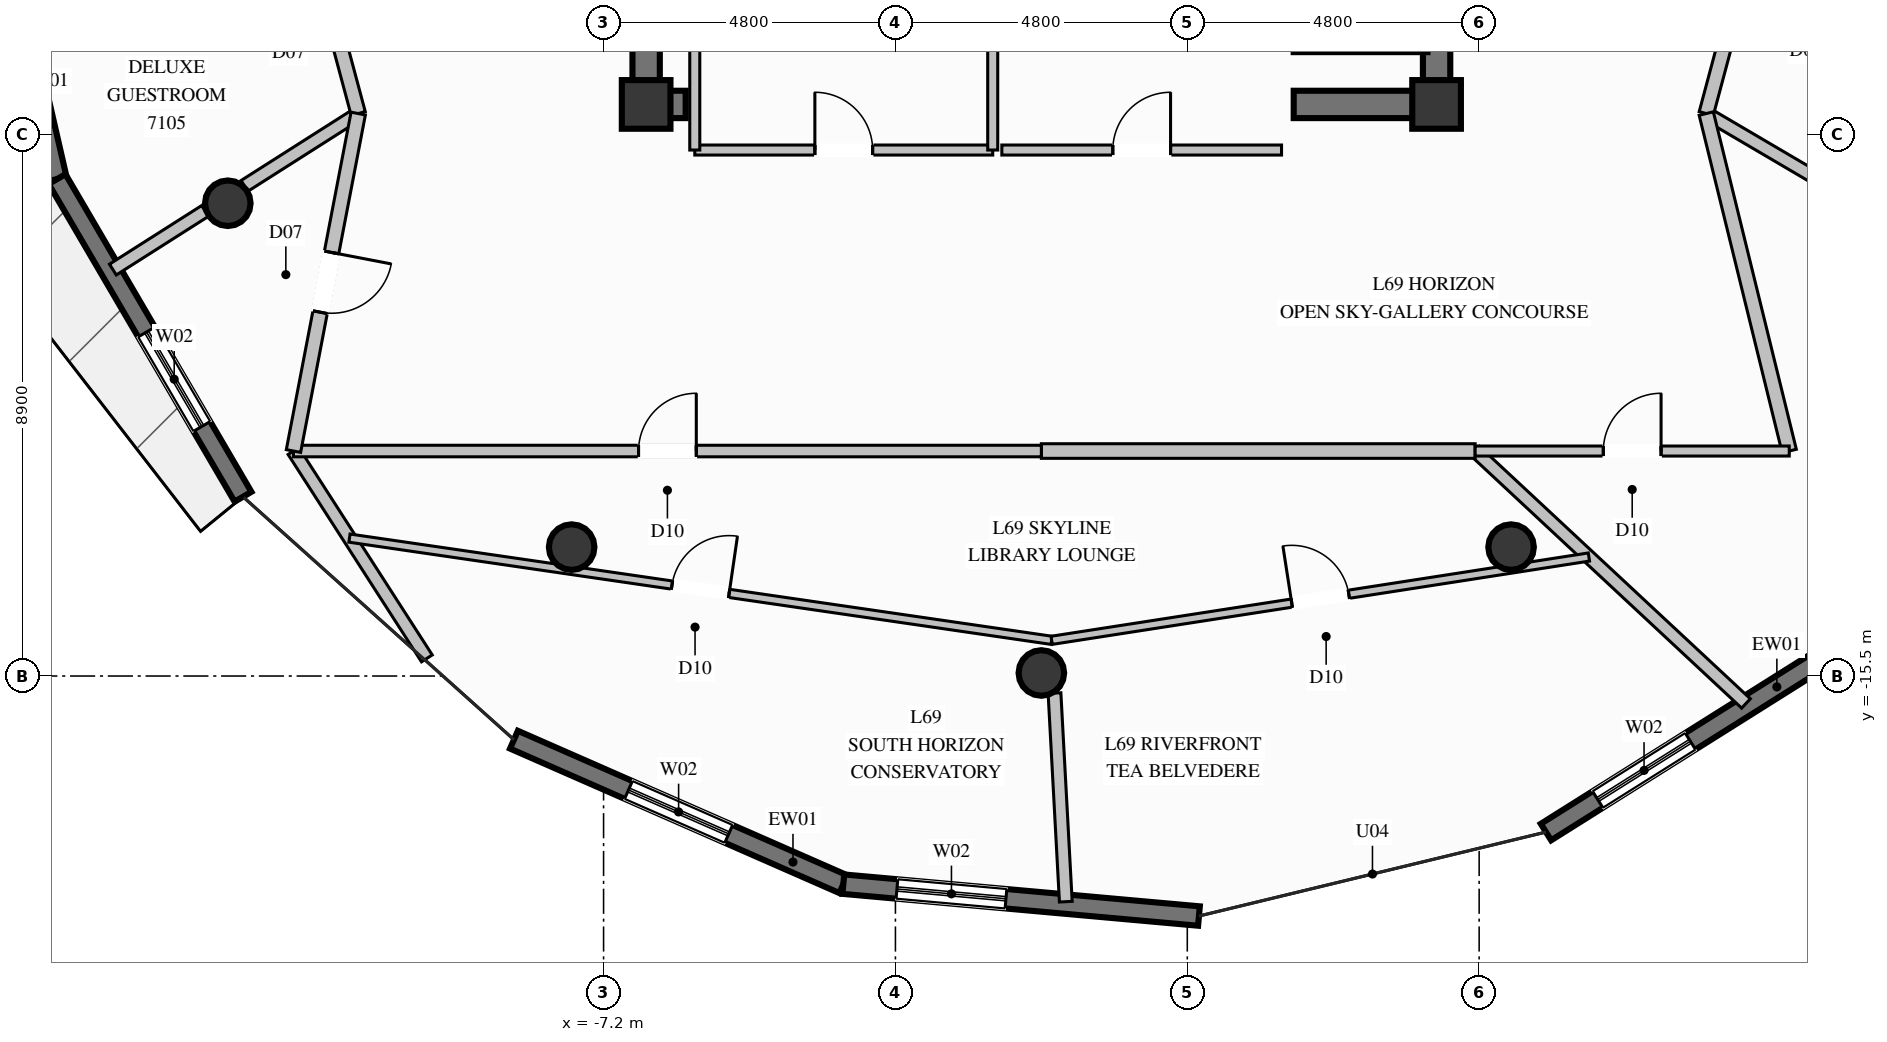
"""IFC4 building model, lengths in metres.
Left out: names, types, materials, properties, quantities, classifications, styles, units other than length and angle.
Written with IfcOpenShell. Run it as: python <this file> out.ifc"""

import sys

from ifc_helpers import new_model, si_unit, direction, frame, frame_2d, origin, origin_2d, place, context, subcontext, project, spatial, rectangle, circle, extrude, element, fill, save


model = new_model("IFC4")
c1 = context("Model", 3, precision=1e-05, world=origin(), true_north=direction((0.0, 1.0)))
c2 = subcontext(c1, "Body", "Model", "MODEL_VIEW")
j1 = project(units=[si_unit("LENGTHUNIT", "METRE"), si_unit("PLANEANGLEUNIT", "RADIAN")], contexts=[c1])
p1 = place(None, origin())
s1 = spatial("IfcSite", under=j1, at=p1, CompositionType="ELEMENT")
p2 = place(p1, origin())
s2 = spatial("IfcBuilding", under=s1, at=p2, CompositionType="ELEMENT")
p3 = place(p2, frame((0.0, 0.0, 266.8)))
s3 = spatial("IfcBuildingStorey", under=s2, at=p3, CompositionType="ELEMENT", Elevation=266.8)
for number, where, z_axis, x_axis in (
    (1, (-6.5, -6.1, 0.0), (0.0, 0.0, 1.0), (1.0, 0.0, 0.0)),
    (2, (6.5, -6.1, 0.0), (0.0, 0.0, 1.0), (1.0, 0.0, 0.0)),
):
    element("IfcColumn", number, at=place(p3, frame(where, z_axis=z_axis, x_axis=x_axis)), inside=s3, PredefinedType="COLUMN", context=c2, shape_type="SweptSolid", body=[
        extrude(rectangle(XDim=0.8, YDim=0.8, at=origin_2d()), origin(), (0.0, 0.0, 1.0), 3.8),
    ])
p4 = place(p3, frame((-6.275, -6.1, 0.0), z_axis=(0.0, 0.0, 1.0), x_axis=(1.0, 0.0, 0.0)))
e3 = element("IfcWall", 3, at=p4, inside=s3, PredefinedType="SHEAR", context=c2, shape_type="SweptSolid", body=[
    extrude(rectangle(XDim=0.425, YDim=0.45, at=frame_2d((0.212, 0.0))), origin(), (0.0, 0.0, 1.0), 3.8),
])
p5 = place(p3, frame((4.15, -6.1, 0.0), z_axis=(0.0, 0.0, 1.0), x_axis=(1.0, 0.0, 0.0)))
e4 = element("IfcWall", 4, at=p5, inside=s3, PredefinedType="SHEAR", context=c2, shape_type="SweptSolid", body=[
    extrude(rectangle(XDim=2.125, YDim=0.45, at=frame_2d((1.062, 0.0))), origin(), (0.0, 0.0, 1.0), 3.8),
])
p6 = place(p3, frame((-6.5, -6.325, 0.0), z_axis=(0.0, 0.0, 1.0), x_axis=(0.0, 1.0, 0.0)))
e5 = element("IfcWall", 5, at=p6, inside=s3, PredefinedType="SHEAR", context=c2, shape_type="SweptSolid", body=[
    extrude(rectangle(XDim=2.975, YDim=0.45, at=frame_2d((1.487, 0.0))), origin(), (0.0, 0.0, 1.0), 3.8),
])
p7 = place(p3, frame((6.5, -6.325, 0.0), z_axis=(0.0, 0.0, 1.0), x_axis=(0.0, 1.0, 0.0)))
e6 = element("IfcWall", 6, at=p7, inside=s3, PredefinedType="SHEAR", context=c2, shape_type="SweptSolid", body=[
    extrude(rectangle(XDim=3.975, YDim=0.45, at=frame_2d((1.987, 0.0))), origin(), (0.0, 0.0, 1.0), 3.8),
])
for number, where, z_axis, x_axis in (
    (7, (-13.38, -7.725, 0.0), (0.0, 0.0, 1.0), (1.0, 0.0, 0.0)),
    (8, (-7.725, -13.38, 0.0), (0.0, 0.0, 1.0), (1.0, 0.0, 0.0)),
    (9, (0.0, -15.45, 0.0), (0.0, 0.0, 1.0), (1.0, 0.0, 0.0)),
    (10, (7.725, -13.38, 0.0), (0.0, 0.0, 1.0), (1.0, 0.0, 0.0)),
):
    element("IfcColumn", number, at=place(p3, frame(where, z_axis=z_axis, x_axis=x_axis)), inside=s3, PredefinedType="COLUMN", context=c2, shape_type="SweptSolid", body=[
        extrude(circle(Radius=0.375, at=origin_2d()), origin(), (0.0, 0.0, 1.0), 3.8),
    ])
p8 = place(p3, frame((13.307, -14.918, 0.0), z_axis=(0.0, 0.0, 1.0), x_axis=(-0.846622734403, -0.532193522689, 0.0)))
e11 = element("IfcWall", 11, at=p8, inside=s3, PredefinedType="SOLIDWALL", context=c2, shape_type="SweptSolid", body=[
    extrude(rectangle(XDim=5.915, YDim=0.32, at=frame_2d((2.958, 0.0))), origin(), (0.0, 0.0, 1.0), 3.57),
])
p9 = place(p8, frame((3.11, 0.0, 0.35)))
e12 = element("IfcOpeningElement", 12, at=p9, cuts=e11, PredefinedType="OPENING", context=c2, shape_type="SweptSolid", body=[
    extrude(rectangle(XDim=1.8, YDim=2.6, at=frame_2d((0.9, 1.3))), frame((0.0, 0.17, 0.0), z_axis=(0.0, -1.0, 0.0), x_axis=(1.0, 0.0, 0.0)), (0.0, 0.0, 1.0), 0.34),
])
p10 = place(p3, frame((-16.188, -7.328, 0.0), z_axis=(0.0, 0.0, 1.0), x_axis=(-0.223282610096, 0.974753751482, 0.0)))
e13 = element("IfcWall", 13, at=p10, inside=s3, PredefinedType="SOLIDWALL", context=c2, shape_type="SweptSolid", body=[
    extrude(rectangle(XDim=6.096, YDim=0.32, at=frame_2d((3.048, 0.0))), origin(), (0.0, 0.0, 1.0), 3.57),
])
p11 = place(p10, frame((2.148, 0.0, 0.35)))
e14 = element("IfcOpeningElement", 14, at=p11, cuts=e13, PredefinedType="OPENING", context=c2, shape_type="SweptSolid", body=[
    extrude(rectangle(XDim=1.8, YDim=2.6, at=frame_2d((0.9, 1.3))), frame((0.0, 0.17, 0.0), z_axis=(0.0, -1.0, 0.0), x_axis=(1.0, 0.0, 0.0)), (0.0, 0.0, 1.0), 0.34),
])
p12 = place(p3, frame((-13.13, -12.552, 0.0), z_axis=(0.0, 0.0, 1.0), x_axis=(-0.505189458577, 0.863008465163, 0.0)))
e15 = element("IfcWall", 15, at=p12, inside=s3, PredefinedType="SOLIDWALL", context=c2, shape_type="SweptSolid", body=[
    extrude(rectangle(XDim=6.053, YDim=0.32, at=frame_2d((3.027, 0.0))), origin(), (0.0, 0.0, 1.0), 3.57),
])
p13 = place(p12, frame((1.34, 0.0, 0.35)))
e16 = element("IfcOpeningElement", 16, at=p13, cuts=e15, PredefinedType="OPENING", context=c2, shape_type="SweptSolid", body=[
    extrude(rectangle(XDim=1.8, YDim=2.6, at=frame_2d((0.9, 1.3))), frame((0.0, 0.17, 0.0), z_axis=(0.0, -1.0, 0.0), x_axis=(1.0, 0.0, 0.0)), (0.0, 0.0, 1.0), 0.34),
])
p14 = place(p3, frame((-3.257, -18.923, 0.0), z_axis=(0.0, 0.0, 1.0), x_axis=(-0.915781816255, 0.401676069758, 0.0)))
e17 = element("IfcWall", 17, at=p14, inside=s3, PredefinedType="SOLIDWALL", context=c2, shape_type="SweptSolid", body=[
    extrude(rectangle(XDim=5.915, YDim=0.32, at=frame_2d((2.958, 0.0))), origin(), (0.0, 0.0, 1.0), 3.57),
])
p15 = place(p14, frame((2.058, 0.0, 0.35)))
e18 = element("IfcOpeningElement", 18, at=p15, cuts=e17, PredefinedType="OPENING", context=c2, shape_type="SweptSolid", body=[
    extrude(rectangle(XDim=1.8, YDim=2.6, at=frame_2d((0.9, 1.3))), frame((0.0, 0.17, 0.0), z_axis=(0.0, -1.0, 0.0), x_axis=(1.0, 0.0, 0.0)), (0.0, 0.0, 1.0), 0.34),
])
p16 = place(p3, frame((2.592, -19.447, 0.0), z_axis=(0.0, 0.0, 1.0), x_axis=(-0.996012281509, 0.089216226568, 0.0)))
e19 = element("IfcWall", 19, at=p16, inside=s3, PredefinedType="SOLIDWALL", context=c2, shape_type="SweptSolid", body=[
    extrude(rectangle(XDim=5.873, YDim=0.32, at=frame_2d((2.936, 0.0))), origin(), (0.0, 0.0, 1.0), 3.57),
])
p17 = place(p16, frame((3.187, 0.0, 0.35)))
e20 = element("IfcOpeningElement", 20, at=p17, cuts=e19, PredefinedType="OPENING", context=c2, shape_type="SweptSolid", body=[
    extrude(rectangle(XDim=1.8, YDim=2.6, at=frame_2d((0.9, 1.3))), frame((0.0, 0.17, 0.0), z_axis=(0.0, -1.0, 0.0), x_axis=(1.0, 0.0, 0.0)), (0.0, 0.0, 1.0), 0.34),
])
p18 = place(p3, frame((-5.7, -6.85, 0.0), z_axis=(0.0, 0.0, 1.0), x_axis=(1.0, 0.0, 0.0)))
e21 = element("IfcWall", 21, at=p18, inside=s3, PredefinedType="PARTITIONING", context=c2, shape_type="SweptSolid", body=[
    extrude(rectangle(XDim=4.9, YDim=0.165, at=frame_2d((2.45, 0.0))), origin(), (0.0, 0.0, 1.0), 2.655),
])
p19 = place(p18, frame((1.975, 0.0, 0.0)))
e22 = element("IfcOpeningElement", 22, at=p19, cuts=e21, PredefinedType="OPENING", context=c2, shape_type="SweptSolid", body=[
    extrude(rectangle(XDim=0.95, YDim=2.1, at=frame_2d((0.475, 1.05))), frame((0.0, 0.093, 0.0), z_axis=(0.0, -1.0, 0.0), x_axis=(1.0, 0.0, 0.0)), (0.0, 0.0, 1.0), 0.185),
])
p20 = place(p3, frame((-0.8, -6.85, 0.0), z_axis=(0.0, 0.0, 1.0), x_axis=(0.0, 1.0, 0.0)))
e23 = element("IfcWall", 23, at=p20, inside=s3, PredefinedType="PARTITIONING", context=c2, shape_type="SweptSolid", body=[
    extrude(rectangle(XDim=3.35, YDim=0.165, at=frame_2d((1.675, 0.0))), origin(), (0.0, 0.0, 1.0), 3.57),
])
p21 = place(p3, frame((-5.7, -3.5, 0.0), z_axis=(0.0, 0.0, 1.0), x_axis=(0.0, -1.0, 0.0)))
e24 = element("IfcWall", 24, at=p21, inside=s3, PredefinedType="PARTITIONING", context=c2, shape_type="SweptSolid", body=[
    extrude(rectangle(XDim=3.35, YDim=0.165, at=frame_2d((1.675, 0.0))), origin(), (0.0, 0.0, 1.0), 2.655),
])
p22 = place(p3, frame((-0.65, -6.85, 0.0), z_axis=(0.0, 0.0, 1.0), x_axis=(1.0, 0.0, 0.0)))
e25 = element("IfcWall", 25, at=p22, inside=s3, PredefinedType="PARTITIONING", context=c2, shape_type="SweptSolid", body=[
    extrude(rectangle(XDim=4.6, YDim=0.165, at=frame_2d((2.3, 0.0))), origin(), (0.0, 0.0, 1.0), 2.655),
])
p23 = place(p22, frame((1.825, 0.0, 0.0)))
e26 = element("IfcOpeningElement", 26, at=p23, cuts=e25, PredefinedType="OPENING", context=c2, shape_type="SweptSolid", body=[
    extrude(rectangle(XDim=0.95, YDim=2.1, at=frame_2d((0.475, 1.05))), frame((0.0, 0.093, 0.0), z_axis=(0.0, -1.0, 0.0), x_axis=(1.0, 0.0, 0.0)), (0.0, 0.0, 1.0), 0.185),
])
p24 = place(p3, frame((-11.235, -6.25, 0.0), z_axis=(0.0, 0.0, 1.0), x_axis=(-0.843783883801, -0.536683107092, 0.0)))
e27 = element("IfcWall", 27, at=p24, inside=s3, PredefinedType="PARTITIONING", context=c2, shape_type="SweptSolid", body=[
    extrude(rectangle(XDim=2.217, YDim=0.21, at=frame_2d((1.109, 0.0))), origin(), (0.0, 0.0, 1.0), 3.085),
])
p25 = place(p3, frame((-13.754, -7.852, 0.0), z_axis=(0.0, 0.0, 1.0), x_axis=(-0.843896422102, -0.536506131152, 0.0)))
e28 = element("IfcWall", 28, at=p25, inside=s3, PredefinedType="PARTITIONING", context=c2, shape_type="SweptSolid", body=[
    extrude(rectangle(XDim=1.797, YDim=0.21, at=frame_2d((0.898, 0.0))), origin(), (0.0, 0.0, 1.0), 3.57),
])
p26 = place(p3, frame((10.935, -6.25, 0.0), z_axis=(0.0, 0.0, 1.0), x_axis=(0.862250119525, -0.506482705903, 0.0)))
e29 = element("IfcWall", 29, at=p26, inside=s3, PredefinedType="PARTITIONING", context=c2, shape_type="SweptSolid", body=[
    extrude(rectangle(XDim=2.462, YDim=0.21, at=frame_2d((1.231, 0.0))), origin(), (0.0, 0.0, 1.0), 3.085),
])
p27 = place(p3, frame((-12.23, -2.538, 0.0), z_axis=(0.0, 0.0, 1.0), x_axis=(0.258884274469, -0.965908345772, 0.0)))
e30 = element("IfcWall", 30, at=p27, inside=s3, PredefinedType="PARTITIONING", context=c2, shape_type="SweptSolid", body=[
    extrude(rectangle(XDim=3.843, YDim=0.24, at=frame_2d((1.921, 0.0))), origin(), (0.0, 0.0, 1.0), 3.57),
])
p28 = place(p27, frame((1.422, 0.0, 0.0)))
e31 = element("IfcOpeningElement", 31, at=p28, cuts=e30, PredefinedType="OPENING", context=c2, shape_type="SweptSolid", body=[
    extrude(rectangle(XDim=1.0, YDim=2.2, at=frame_2d((0.5, 1.1))), frame((0.0, 0.13, 0.0), z_axis=(0.0, -1.0, 0.0), x_axis=(1.0, 0.0, 0.0)), (0.0, 0.0, 1.0), 0.26),
])
p29 = place(p3, frame((10.935, -6.25, 0.0), z_axis=(0.0, 0.0, 1.0), x_axis=(0.258727314432, 0.96595040078, 0.0)))
e32 = element("IfcWall", 32, at=p29, inside=s3, PredefinedType="PARTITIONING", context=c2, shape_type="SweptSolid", body=[
    extrude(rectangle(XDim=2.783, YDim=0.24, at=frame_2d((1.391, 0.0))), origin(), (0.0, 0.0, 1.0), 3.57),
])
p30 = place(p3, frame((7.134, -11.8, 0.0), z_axis=(0.0, 0.0, 1.0), x_axis=(0.731644317953, -0.681686579013, 0.0)))
e33 = element("IfcWall", 33, at=p30, inside=s3, PredefinedType="PARTITIONING", context=c2, shape_type="SweptSolid", body=[
    extrude(rectangle(XDim=6.089, YDim=0.21, at=frame_2d((3.044, 0.0))), origin(), (0.0, 0.0, 1.0), 3.57),
])
p31 = place(p3, frame((-12.3, -11.8, 0.0), z_axis=(0.0, 0.0, 1.0), x_axis=(0.541107501705, -0.840953430101, 0.0)))
e34 = element("IfcWall", 34, at=p31, inside=s3, PredefinedType="PARTITIONING", context=c2, shape_type="SweptSolid", body=[
    extrude(rectangle(XDim=4.055, YDim=0.21, at=frame_2d((2.027, 0.0))), origin(), (0.0, 0.0, 1.0), 3.57),
])
p32 = place(p3, frame((0.0, -11.8, 0.0), z_axis=(0.0, 0.0, 1.0), x_axis=(1.0, 0.0, 0.0)))
e35 = element("IfcWall", 35, at=p32, inside=s3, PredefinedType="PARTITIONING", context=c2, shape_type="SweptSolid", body=[
    extrude(rectangle(XDim=7.134, YDim=0.24, at=frame_2d((3.567, 0.0))), origin(), (0.0, 0.0, 1.0), 3.57),
])
p33 = place(p3, frame((-12.3, -11.8, 0.0), z_axis=(0.0, 0.0, 1.0), x_axis=(1.0, 0.0, 0.0)))
e36 = element("IfcWall", 36, at=p33, inside=s3, PredefinedType="PARTITIONING", context=c2, shape_type="SweptSolid", body=[
    extrude(rectangle(XDim=12.3, YDim=0.19, at=frame_2d((6.15, 0.0))), origin(), (0.0, 0.0, 1.0), 3.57),
])
p34 = place(p33, frame((5.675, 0.0, 0.0)))
e37 = element("IfcOpeningElement", 37, at=p34, cuts=e36, PredefinedType="OPENING", context=c2, shape_type="SweptSolid", body=[
    extrude(rectangle(XDim=0.95, YDim=2.1, at=frame_2d((0.475, 1.05))), frame((0.0, 0.105, 0.0), z_axis=(0.0, -1.0, 0.0), x_axis=(1.0, 0.0, 0.0)), (0.0, 0.0, 1.0), 0.21),
])
p35 = place(p3, frame((-11.235, -6.25, 0.0), z_axis=(0.0, 0.0, 1.0), x_axis=(-0.18844199237, -0.982084321997, 0.0)))
e38 = element("IfcWall", 38, at=p35, inside=s3, PredefinedType="PARTITIONING", context=c2, shape_type="SweptSolid", body=[
    extrude(rectangle(XDim=5.651, YDim=0.24, at=frame_2d((2.826, 0.0))), origin(), (0.0, 0.0, 1.0), 3.57),
])
p36 = place(p35, frame((2.326, 0.0, 0.0)))
e39 = element("IfcOpeningElement", 39, at=p36, cuts=e38, PredefinedType="OPENING", context=c2, shape_type="SweptSolid", body=[
    extrude(rectangle(XDim=1.0, YDim=2.2, at=frame_2d((0.5, 1.1))), frame((0.0, 0.13, 0.0), z_axis=(0.0, -1.0, 0.0), x_axis=(1.0, 0.0, 0.0)), (0.0, 0.0, 1.0), 0.26),
])
p37 = place(p3, frame((0.216, -15.781, 0.0), z_axis=(0.0, 0.0, 1.0), x_axis=(0.054159130596, -0.99853231724, 0.0)))
e40 = element("IfcWall", 40, at=p37, inside=s3, PredefinedType="PARTITIONING", context=c2, shape_type="SweptSolid", body=[
    extrude(rectangle(XDim=3.435, YDim=0.21, at=frame_2d((1.718, 0.0))), origin(), (0.0, 0.0, 1.0), 3.57),
])
p38 = place(p3, frame((-11.379, -13.232, 0.0), z_axis=(0.0, 0.0, 1.0), x_axis=(0.989568551516, -0.144062770523, 0.0)))
e41 = element("IfcWall", 41, at=p38, inside=s3, PredefinedType="PARTITIONING", context=c2, shape_type="SweptSolid", body=[
    extrude(rectangle(XDim=11.67, YDim=0.135, at=frame_2d((5.835, 0.0))), origin(), (0.0, 0.0, 1.0), 3.137),
])
p39 = place(p38, frame((5.36, 0.0, 0.0)))
e42 = element("IfcOpeningElement", 42, at=p39, cuts=e41, PredefinedType="OPENING", context=c2, shape_type="SweptSolid", body=[
    extrude(rectangle(XDim=0.95, YDim=2.1, at=frame_2d((0.475, 1.05))), frame((0.0, 0.078, 0.0), z_axis=(0.0, -1.0, 0.0), x_axis=(1.0, 0.0, 0.0)), (0.0, 0.0, 1.0), 0.155),
])
p40 = place(p3, frame((0.169, -14.913, 0.0), z_axis=(0.0, 0.0, 1.0), x_axis=(0.988190446512, 0.153230680422, 0.0)))
e43 = element("IfcWall", 43, at=p40, inside=s3, PredefinedType="PARTITIONING", context=c2, shape_type="SweptSolid", body=[
    extrude(rectangle(XDim=8.942, YDim=0.135, at=frame_2d((4.471, 0.0))), origin(), (0.0, 0.0, 1.0), 3.137),
])
p41 = place(p40, frame((3.996, 0.0, 0.0)))
e44 = element("IfcOpeningElement", 44, at=p41, cuts=e43, PredefinedType="OPENING", context=c2, shape_type="SweptSolid", body=[
    extrude(rectangle(XDim=0.95, YDim=2.1, at=frame_2d((0.475, 1.05))), frame((0.0, 0.078, 0.0), z_axis=(0.0, -1.0, 0.0), x_axis=(1.0, 0.0, 0.0)), (0.0, 0.0, 1.0), 0.155),
])
p42 = place(p3, frame((12.3, -11.8, 0.0), z_axis=(0.0, 0.0, 1.0), x_axis=(-0.238825099749, 0.971062599285, 0.0)))
e45 = element("IfcWall", 45, at=p42, inside=s3, PredefinedType="PARTITIONING", context=c2, shape_type="SweptSolid", body=[
    extrude(rectangle(XDim=5.715, YDim=0.24, at=frame_2d((2.858, 0.0))), origin(), (0.0, 0.0, 1.0), 3.57),
])
p43 = place(p3, frame((7.134, -11.8, 0.0), z_axis=(0.0, 0.0, 1.0), x_axis=(1.0, 0.0, 0.0)))
e46 = element("IfcWall", 46, at=p43, inside=s3, PredefinedType="PARTITIONING", context=c2, shape_type="SweptSolid", body=[
    extrude(rectangle(XDim=5.166, YDim=0.165, at=frame_2d((2.583, 0.0))), origin(), (0.0, 0.0, 1.0), 3.57),
])
p44 = place(p43, frame((2.108, 0.0, 0.0)))
e47 = element("IfcOpeningElement", 47, at=p44, cuts=e46, PredefinedType="OPENING", context=c2, shape_type="SweptSolid", body=[
    extrude(rectangle(XDim=0.95, YDim=2.1, at=frame_2d((0.475, 1.05))), frame((0.0, 0.093, 0.0), z_axis=(0.0, -1.0, 0.0), x_axis=(1.0, 0.0, 0.0)), (0.0, 0.0, 1.0), 0.185),
])
p45 = place(p9, origin())
e48 = element("IfcWindow", 48, at=p45, inside=s3, PartitioningType="SINGLE_PANEL", PredefinedType="WINDOW", context=c2, shape_type="SweptSolid", body=[
    extrude(rectangle(XDim=1.8, YDim=2.6, at=frame_2d((0.9, 1.3))), frame((0.0, 0.03, 0.0), z_axis=(0.0, -1.0, 0.0), x_axis=(1.0, 0.0, 0.0)), (0.0, 0.0, 1.0), 0.06),
])
fill(e12, e48)
p46 = place(p13, origin())
e49 = element("IfcWindow", 49, at=p46, inside=s3, PartitioningType="SINGLE_PANEL", PredefinedType="WINDOW", context=c2, shape_type="SweptSolid", body=[
    extrude(rectangle(XDim=1.8, YDim=2.6, at=frame_2d((0.9, 1.3))), frame((0.0, 0.03, 0.0), z_axis=(0.0, -1.0, 0.0), x_axis=(1.0, 0.0, 0.0)), (0.0, 0.0, 1.0), 0.06),
])
fill(e16, e49)
p47 = place(p15, origin())
e50 = element("IfcWindow", 50, at=p47, inside=s3, PartitioningType="SINGLE_PANEL", PredefinedType="WINDOW", context=c2, shape_type="SweptSolid", body=[
    extrude(rectangle(XDim=1.8, YDim=2.6, at=frame_2d((0.9, 1.3))), frame((0.0, 0.03, 0.0), z_axis=(0.0, -1.0, 0.0), x_axis=(1.0, 0.0, 0.0)), (0.0, 0.0, 1.0), 0.06),
])
fill(e18, e50)
p48 = place(p17, origin())
e51 = element("IfcWindow", 51, at=p48, inside=s3, PartitioningType="SINGLE_PANEL", PredefinedType="WINDOW", context=c2, shape_type="SweptSolid", body=[
    extrude(rectangle(XDim=1.8, YDim=2.6, at=frame_2d((0.9, 1.3))), frame((0.0, 0.03, 0.0), z_axis=(0.0, -1.0, 0.0), x_axis=(1.0, 0.0, 0.0)), (0.0, 0.0, 1.0), 0.06),
])
fill(e20, e51)
p49 = place(p19, origin())
e52 = element("IfcDoor", 52, at=p49, inside=s3, OperationType="SINGLE_SWING_LEFT", PredefinedType="DOOR", context=c2, shape_type="SweptSolid", body=[
    extrude(rectangle(XDim=0.95, YDim=2.1, at=frame_2d((0.475, 1.05))), frame((0.0, 0.025, 0.0), z_axis=(0.0, -1.0, 0.0), x_axis=(1.0, 0.0, 0.0)), (0.0, 0.0, 1.0), 0.05),
])
fill(e22, e52)
p50 = place(p23, origin())
e53 = element("IfcDoor", 53, at=p50, inside=s3, OperationType="SINGLE_SWING_RIGHT", PredefinedType="DOOR", context=c2, shape_type="SweptSolid", body=[
    extrude(rectangle(XDim=0.95, YDim=2.1, at=frame_2d((0.475, 1.05))), frame((0.0, 0.025, 0.0), z_axis=(0.0, -1.0, 0.0), x_axis=(1.0, 0.0, 0.0)), (0.0, 0.0, 1.0), 0.05),
])
fill(e26, e53)
p51 = place(p34, origin())
e54 = element("IfcDoor", 54, at=p51, inside=s3, OperationType="SINGLE_SWING_RIGHT", PredefinedType="DOOR", context=c2, shape_type="SweptSolid", body=[
    extrude(rectangle(XDim=0.95, YDim=2.1, at=frame_2d((0.475, 1.05))), frame((0.0, 0.025, 0.0), z_axis=(0.0, -1.0, 0.0), x_axis=(1.0, 0.0, 0.0)), (0.0, 0.0, 1.0), 0.05),
])
fill(e37, e54)
p52 = place(p36, origin())
e55 = element("IfcDoor", 55, at=p52, inside=s3, OperationType="SINGLE_SWING_LEFT", PredefinedType="DOOR", context=c2, shape_type="SweptSolid", body=[
    extrude(rectangle(XDim=1.0, YDim=2.2, at=frame_2d((0.5, 1.1))), frame((0.0, 0.025, 0.0), z_axis=(0.0, -1.0, 0.0), x_axis=(1.0, 0.0, 0.0)), (0.0, 0.0, 1.0), 0.05),
])
fill(e39, e55)
p53 = place(p39, origin())
e56 = element("IfcDoor", 56, at=p53, inside=s3, OperationType="SINGLE_SWING_RIGHT", PredefinedType="DOOR", context=c2, shape_type="SweptSolid", body=[
    extrude(rectangle(XDim=0.95, YDim=2.1, at=frame_2d((0.475, 1.05))), frame((0.0, 0.025, 0.0), z_axis=(0.0, -1.0, 0.0), x_axis=(1.0, 0.0, 0.0)), (0.0, 0.0, 1.0), 0.05),
])
fill(e42, e56)
p54 = place(p41, origin())
e57 = element("IfcDoor", 57, at=p54, inside=s3, OperationType="SINGLE_SWING_LEFT", PredefinedType="DOOR", context=c2, shape_type="SweptSolid", body=[
    extrude(rectangle(XDim=0.95, YDim=2.1, at=frame_2d((0.475, 1.05))), frame((0.0, 0.025, 0.0), z_axis=(0.0, -1.0, 0.0), x_axis=(1.0, 0.0, 0.0)), (0.0, 0.0, 1.0), 0.05),
])
fill(e44, e57)
p55 = place(p44, origin())
e58 = element("IfcDoor", 58, at=p55, inside=s3, OperationType="SINGLE_SWING_RIGHT", PredefinedType="DOOR", context=c2, shape_type="SweptSolid", body=[
    extrude(rectangle(XDim=0.95, YDim=2.1, at=frame_2d((0.475, 1.05))), frame((0.0, 0.025, 0.0), z_axis=(0.0, -1.0, 0.0), x_axis=(1.0, 0.0, 0.0)), (0.0, 0.0, 1.0), 0.05),
])
fill(e47, e58)
save(model, sys.argv[1])
